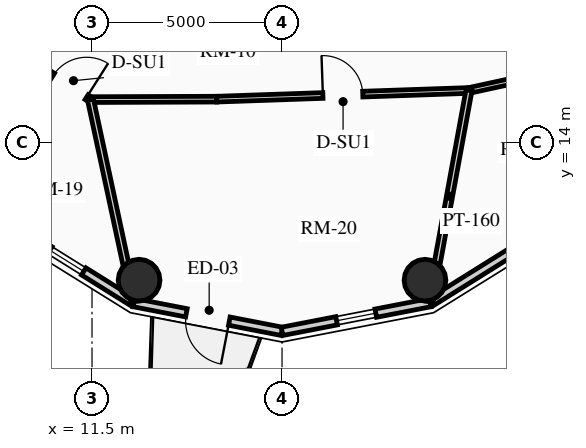
"""IFC4 building model, lengths in metres.
Left out: names, types, materials, properties, quantities, classifications, styles, units other than length and angle.
Written with IfcOpenShell. Run it as: python <this file> out.ifc"""

import sys

from ifc_helpers import new_model, si_unit, direction, frame, frame_2d, origin, origin_2d, place, context, subcontext, project, spatial, rectangle, circle, extrude, source, transform, mapped, element, fill, save


model = new_model("IFC4")
c1 = context("Model", 3, precision=1e-05, world=origin(), true_north=direction((0.0, 1.0)))
c2 = subcontext(c1, "Body", "Model", "MODEL_VIEW")
j1 = project(units=[si_unit("LENGTHUNIT", "METRE"), si_unit("PLANEANGLEUNIT", "RADIAN")], contexts=[c1])
p1 = place(None, origin())
s1 = spatial("IfcSite", under=j1, at=p1, CompositionType="ELEMENT")
p2 = place(p1, origin())
s2 = spatial("IfcBuilding", under=s1, at=p2, CompositionType="ELEMENT")
p3 = place(p2, frame((0.0, 0.0, 208.3)))
s3 = spatial("IfcBuildingStorey", under=s2, at=p3, CompositionType="ELEMENT", Elevation=208.3)
for number, where, z_axis, x_axis in (
    (1, (12.739, 10.377, 0.0), (0.0, 0.0, 1.0), (1.0, 0.0, 0.0)),
    (2, (20.261, 10.377, 0.0), (0.0, 0.0, 1.0), (1.0, 0.0, 0.0)),
):
    element("IfcColumn", number, at=place(p3, frame(where, z_axis=z_axis, x_axis=x_axis)), inside=s3, PredefinedType="USERDEFINED", context=c2, shape_type="SweptSolid", body=[
        extrude(circle(Radius=0.55, at=origin_2d()), origin(), (0.0, 0.0, 1.0), 2.91),
    ])
p4 = place(p3, frame((12.597, 9.787, 0.0), z_axis=(0.0, 0.0, 1.0), x_axis=(-0.848318713376, 0.529485939886, 0.0)))
e3 = element("IfcWall", 3, at=p4, inside=s3, PredefinedType="SOLIDWALL", context=c2, shape_type="SweptSolid", body=[
    extrude(rectangle(XDim=4.15, YDim=0.22, at=frame_2d((2.075, 0.0))), origin(), (0.0, 0.0, 1.0), 2.322),
])
m1 = source(origin(), c2, "Body", "SweptSolid", [
    extrude(rectangle(XDim=1.05, YDim=1.3, at=frame_2d((0.525, 0.65))), frame((0.0, 0.12, 0.0), z_axis=(0.0, -1.0, 0.0), x_axis=(1.0, 0.0, 0.0)), (0.0, 0.0, 1.0), 0.24),
])
p5 = place(p4, frame((1.55, 0.0, 0.65)))
e4 = element("IfcOpeningElement", 4, at=p5, cuts=e3, PredefinedType="OPENING", context=c2, shape_type="MappedRepresentation", body=[
    mapped(m1, transform((0.0, 0.0, 0.0), x_axis=(1.0, 0.0, 0.0), y_axis=(0.0, 1.0, 0.0), z_axis=(0.0, 0.0, 1.0), scale=1.0)),
])
p6 = place(p3, frame((16.5, 9.03, 0.0), z_axis=(0.0, 0.0, 1.0), x_axis=(-0.981700307484, 0.190432419211, 0.0)))
e5 = element("IfcWall", 5, at=p6, inside=s3, PredefinedType="SOLIDWALL", context=c2, shape_type="SweptSolid", body=[
    extrude(rectangle(XDim=3.976, YDim=0.22, at=frame_2d((1.988, 0.0))), origin(), (0.0, 0.0, 1.0), 2.322),
])
m2 = source(origin(), c2, "Body", "SweptSolid", [
    extrude(rectangle(XDim=1.15, YDim=2.005, at=frame_2d((0.575, 1.002))), frame((0.0, 0.12, 0.0), z_axis=(0.0, -1.0, 0.0), x_axis=(1.0, 0.0, 0.0)), (0.0, 0.0, 1.0), 0.24),
])
p7 = place(p6, frame((1.413, 0.0, 0.0)))
e6 = element("IfcOpeningElement", 6, at=p7, cuts=e5, PredefinedType="OPENING", context=c2, shape_type="MappedRepresentation", body=[
    mapped(m2, transform((0.0, 0.0, 0.0), x_axis=(1.0, 0.0, 0.0), y_axis=(0.0, 1.0, 0.0), z_axis=(0.0, 0.0, 1.0), scale=1.0)),
])
p8 = place(p3, frame((20.403, 9.787, 0.0), z_axis=(0.0, 0.0, 1.0), x_axis=(-0.981700307484, -0.190432419211, 0.0)))
e7 = element("IfcWall", 7, at=p8, inside=s3, PredefinedType="SOLIDWALL", context=c2, shape_type="SweptSolid", body=[
    extrude(rectangle(XDim=3.976, YDim=0.22, at=frame_2d((1.988, 0.0))), origin(), (0.0, 0.0, 1.0), 2.322),
])
p9 = place(p8, frame((1.463, 0.0, 0.65)))
e8 = element("IfcOpeningElement", 8, at=p9, cuts=e7, PredefinedType="OPENING", context=c2, shape_type="MappedRepresentation", body=[
    mapped(m1, transform((0.0, 0.0, 0.0), x_axis=(1.0, 0.0, 0.0), y_axis=(0.0, 1.0, 0.0), z_axis=(0.0, 0.0, 1.0), scale=1.0)),
])
p10 = place(p3, frame((23.924, 11.985, 0.0), z_axis=(0.0, 0.0, 1.0), x_axis=(-0.848318713376, -0.529485939886, 0.0)))
e9 = element("IfcWall", 9, at=p10, inside=s3, PredefinedType="SOLIDWALL", context=c2, shape_type="SweptSolid", body=[
    extrude(rectangle(XDim=4.15, YDim=0.22, at=frame_2d((2.075, 0.0))), origin(), (0.0, 0.0, 1.0), 2.322),
])
p11 = place(p3, frame((10.115, 15.983, 0.0), z_axis=(0.0, 0.0, 1.0), x_axis=(0.843995849351, -0.536349705209, 0.0)))
e10 = element("IfcWall", 10, at=p11, inside=s3, PredefinedType="PARTITIONING", context=c2, shape_type="SweptSolid", body=[
    extrude(rectangle(XDim=1.593, YDim=0.15, at=frame_2d((0.796, 0.0))), origin(), (0.0, 0.0, 1.0), 2.255),
])
m3 = source(origin(), c2, "Body", "SweptSolid", [
    extrude(rectangle(XDim=1.05, YDim=2.015, at=frame_2d((0.525, 1.007))), frame((0.0, 0.085, 0.0), z_axis=(0.0, -1.0, 0.0), x_axis=(1.0, 0.0, 0.0)), (0.0, 0.0, 1.0), 0.17),
])
p12 = place(p11, frame((0.423, 0.0, 0.0)))
e11 = element("IfcOpeningElement", 11, at=p12, cuts=e10, PredefinedType="OPENING", context=c2, shape_type="MappedRepresentation", body=[
    mapped(m3, transform((0.0, 0.0, 0.0), x_axis=(1.0, 0.0, 0.0), y_axis=(0.0, 1.0, 0.0), z_axis=(0.0, 0.0, 1.0), scale=1.0)),
])
p13 = place(p3, frame((11.46, 15.129, 0.0), z_axis=(0.0, 0.0, 1.0), x_axis=(0.999993513287, 0.003601858435, 0.0)))
e12 = element("IfcWall", 12, at=p13, inside=s3, PredefinedType="PARTITIONING", context=c2, shape_type="SweptSolid", body=[
    extrude(rectangle(XDim=3.321, YDim=0.15, at=frame_2d((1.661, 0.0))), origin(), (0.0, 0.0, 1.0), 2.322),
])
p14 = place(p3, frame((14.781, 15.141, 0.0), z_axis=(0.0, 0.0, 1.0), x_axis=(0.999407918707, 0.034406569513, 0.0)))
e13 = element("IfcWall", 13, at=p14, inside=s3, PredefinedType="PARTITIONING", context=c2, shape_type="SweptSolid", body=[
    extrude(rectangle(XDim=6.642, YDim=0.15, at=frame_2d((3.321, 0.0))), origin(), (0.0, 0.0, 1.0), 2.255),
])
p15 = place(p14, frame((2.796, 0.0, 0.0)))
e14 = element("IfcOpeningElement", 14, at=p15, cuts=e13, PredefinedType="OPENING", context=c2, shape_type="MappedRepresentation", body=[
    mapped(m3, transform((0.0, 0.0, 0.0), x_axis=(1.0, 0.0, 0.0), y_axis=(0.0, 1.0, 0.0), z_axis=(0.0, 0.0, 1.0), scale=1.0)),
])
p16 = place(p3, frame((21.419, 15.369, 0.0), z_axis=(0.0, 0.0, 1.0), x_axis=(0.977192701953, 0.212354475464, 0.0)))
e15 = element("IfcWall", 15, at=p16, inside=s3, PredefinedType="PARTITIONING", context=c2, shape_type="SweptSolid", body=[
    extrude(rectangle(XDim=1.888, YDim=0.15, at=frame_2d((0.944, 0.0))), origin(), (0.0, 0.0, 1.0), 2.255),
])
p17 = place(p3, frame((11.46, 15.129, 0.0), z_axis=(0.0, 0.0, 1.0), x_axis=(0.210058897642, -0.977688733453, 0.0)))
e16 = element("IfcWall", 16, at=p17, inside=s3, PredefinedType="PARTITIONING", context=c2, shape_type="SweptSolid", body=[
    extrude(rectangle(XDim=5.444, YDim=0.16, at=frame_2d((2.722, 0.0))), origin(), (0.0, 0.0, 1.0), 2.322),
])
p18 = place(p3, frame((21.419, 15.369, 0.0), z_axis=(0.0, 0.0, 1.0), x_axis=(-0.180685606423, -0.98354090491, 0.0)))
e17 = element("IfcWall", 17, at=p18, inside=s3, PredefinedType="PARTITIONING", context=c2, shape_type="SweptSolid", body=[
    extrude(rectangle(XDim=5.656, YDim=0.16, at=frame_2d((2.828, 0.0))), origin(), (0.0, 0.0, 1.0), 2.322),
])
m4 = source(origin(), c2, "Body", "SweptSolid", [
    extrude(rectangle(XDim=1.05, YDim=1.3, at=frame_2d((0.525, 0.65))), frame((0.0, 0.03, 0.0), z_axis=(0.0, -1.0, 0.0), x_axis=(1.0, 0.0, 0.0)), (0.0, 0.0, 1.0), 0.06),
])
p19 = place(p5, origin())
e18 = element("IfcWindow", 18, at=p19, inside=s3, PartitioningType="SINGLE_PANEL", PredefinedType="WINDOW", context=c2, shape_type="MappedRepresentation", body=[
    mapped(m4, transform((0.0, 0.0, 0.0), x_axis=(1.0, 0.0, 0.0), y_axis=(0.0, 1.0, 0.0), z_axis=(0.0, 0.0, 1.0), scale=1.0)),
])
fill(e4, e18)
m5 = source(origin(), c2, "Body", "SweptSolid", [
    extrude(rectangle(XDim=1.15, YDim=2.005, at=frame_2d((0.575, 1.002))), frame((0.0, 0.025, 0.0), z_axis=(0.0, -1.0, 0.0), x_axis=(1.0, 0.0, 0.0)), (0.0, 0.0, 1.0), 0.05),
])
p20 = place(p7, origin())
e19 = element("IfcDoor", 19, at=p20, inside=s3, OperationType="SINGLE_SWING_LEFT", PredefinedType="DOOR", context=c2, shape_type="MappedRepresentation", body=[
    mapped(m5, transform((0.0, 0.0, 0.0), x_axis=(1.0, 0.0, 0.0), y_axis=(0.0, 1.0, 0.0), z_axis=(0.0, 0.0, 1.0), scale=1.0)),
])
fill(e6, e19)
p21 = place(p9, origin())
e20 = element("IfcWindow", 20, at=p21, inside=s3, PartitioningType="SINGLE_PANEL", PredefinedType="WINDOW", context=c2, shape_type="MappedRepresentation", body=[
    mapped(m4, transform((0.0, 0.0, 0.0), x_axis=(1.0, 0.0, 0.0), y_axis=(0.0, 1.0, 0.0), z_axis=(0.0, 0.0, 1.0), scale=1.0)),
])
fill(e8, e20)
m6 = source(origin(), c2, "Body", "SweptSolid", [
    extrude(rectangle(XDim=1.05, YDim=2.015, at=frame_2d((0.525, 1.007))), frame((0.0, 0.025, 0.0), z_axis=(0.0, -1.0, 0.0), x_axis=(1.0, 0.0, 0.0)), (0.0, 0.0, 1.0), 0.05),
])
p22 = place(p12, origin())
e21 = element("IfcDoor", 21, at=p22, inside=s3, OperationType="SINGLE_SWING_RIGHT", PredefinedType="DOOR", context=c2, shape_type="MappedRepresentation", body=[
    mapped(m6, transform((0.0, 0.0, 0.0), x_axis=(1.0, 0.0, 0.0), y_axis=(0.0, 1.0, 0.0), z_axis=(0.0, 0.0, 1.0), scale=1.0)),
])
fill(e11, e21)
p23 = place(p15, origin())
e22 = element("IfcDoor", 22, at=p23, inside=s3, OperationType="SINGLE_SWING_LEFT", PredefinedType="DOOR", context=c2, shape_type="MappedRepresentation", body=[
    mapped(m6, transform((0.0, 0.0, 0.0), x_axis=(1.0, 0.0, 0.0), y_axis=(0.0, 1.0, 0.0), z_axis=(0.0, 0.0, 1.0), scale=1.0)),
])
fill(e14, e22)
save(model, sys.argv[1])
